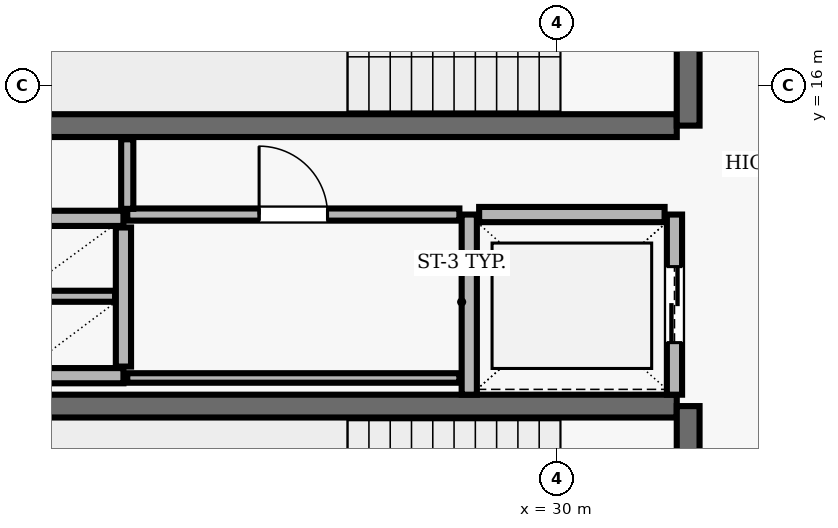
"""IFC4 building model, lengths in metres.
Left out: names, types, materials, properties, quantities, classifications, styles, units other than length and angle.
Written with IfcOpenShell. Run it as: python <this file> out.ifc"""

import sys

from ifc_helpers import new_model, si_unit, direction, frame, frame_2d, origin, place, context, subcontext, project, spatial, rectangle, extrude, element, fill, save


model = new_model("IFC4")
c1 = context("Model", 3, precision=1e-05, world=origin(), true_north=direction((0.0, 1.0)))
c2 = subcontext(c1, "Body", "Model", "MODEL_VIEW")
j1 = project(units=[si_unit("LENGTHUNIT", "METRE"), si_unit("PLANEANGLEUNIT", "RADIAN")], contexts=[c1])
p1 = place(None, origin())
s1 = spatial("IfcSite", under=j1, at=p1, CompositionType="ELEMENT")
p2 = place(p1, origin())
s2 = spatial("IfcBuilding", under=s1, at=p2, CompositionType="ELEMENT")
p3 = place(p2, frame((0.0, 0.0, 210.9)))
s3 = spatial("IfcBuildingStorey", under=s2, at=p3, CompositionType="ELEMENT", Elevation=210.9)
p4 = place(p3, frame((23.22, 15.47, 0.0), z_axis=(0.0, 0.0, 1.0), x_axis=(1.0, 0.0, 0.0)))
e1 = element("IfcWall", 1, at=p4, inside=s3, PredefinedType="SHEAR", context=c2, shape_type="SweptSolid", body=[
    extrude(rectangle(XDim=8.36, YDim=0.3, at=frame_2d((4.18, 0.0))), origin(), (0.0, 0.0, 1.0), 3.69),
])
p5 = place(p3, frame((31.73, 15.47, 0.0), z_axis=(0.0, 0.0, 1.0), x_axis=(0.0, 1.0, 0.0)))
e2 = element("IfcWall", 2, at=p5, inside=s3, PredefinedType="SHEAR", context=c2, shape_type="SweptSolid", body=[
    extrude(rectangle(XDim=3.51, YDim=0.3, at=frame_2d((1.755, 0.0))), origin(), (0.0, 0.0, 1.0), 3.69),
])
p6 = place(p5, frame((1.18, 0.0, 0.0)))
e3 = element("IfcOpeningElement", 3, at=p6, cuts=e2, PredefinedType="OPENING", context=c2, shape_type="SweptSolid", body=[
    extrude(rectangle(XDim=1.15, YDim=2.15, at=frame_2d((0.575, 1.075))), frame((0.0, 0.16, 0.0), z_axis=(0.0, -1.0, 0.0), x_axis=(1.0, 0.0, 0.0)), (0.0, 0.0, 1.0), 0.32),
])
p7 = place(p3, frame((31.58, 11.78, 0.0), z_axis=(0.0, 0.0, 1.0), x_axis=(-1.0, 0.0, 0.0)))
e4 = element("IfcWall", 4, at=p7, inside=s3, PredefinedType="SHEAR", context=c2, shape_type="SweptSolid", body=[
    extrude(rectangle(XDim=8.36, YDim=0.3, at=frame_2d((4.18, 0.0))), origin(), (0.0, 0.0, 1.0), 3.69),
])
p8 = place(p3, frame((31.73, 8.27, 0.0), z_axis=(0.0, 0.0, 1.0), x_axis=(0.0, 1.0, 0.0)))
e5 = element("IfcWall", 5, at=p8, inside=s3, PredefinedType="SHEAR", context=c2, shape_type="SweptSolid", body=[
    extrude(rectangle(XDim=3.51, YDim=0.3, at=frame_2d((1.755, 0.0))), origin(), (0.0, 0.0, 1.0), 3.69),
])
p9 = place(p8, frame((1.18, 0.0, 0.0)))
e6 = element("IfcOpeningElement", 6, at=p9, cuts=e5, PredefinedType="OPENING", context=c2, shape_type="SweptSolid", body=[
    extrude(rectangle(XDim=1.15, YDim=2.15, at=frame_2d((0.575, 1.075))), frame((0.0, 0.16, 0.0), z_axis=(0.0, -1.0, 0.0), x_axis=(1.0, 0.0, 0.0)), (0.0, 0.0, 1.0), 0.32),
])
p10 = place(p3, frame((28.85, 14.3, 0.0), z_axis=(0.0, 0.0, 1.0), x_axis=(0.0, -1.0, 0.0)))
e7 = element("IfcWall", 7, at=p10, inside=s3, PredefinedType="SOLIDWALL", context=c2, shape_type="SweptSolid", body=[
    extrude(rectangle(XDim=2.37, YDim=0.2, at=frame_2d((1.185, 0.0))), origin(), (0.0, 0.0, 1.0), 3.69),
])
p11 = place(p3, frame((31.55, 11.93, 0.0), z_axis=(0.0, 0.0, 1.0), x_axis=(0.0, 1.0, 0.0)))
e8 = element("IfcWall", 8, at=p11, inside=s3, PredefinedType="SOLIDWALL", context=c2, shape_type="SweptSolid", body=[
    extrude(rectangle(XDim=2.37, YDim=0.2, at=frame_2d((1.185, 0.0))), origin(), (0.0, 0.0, 1.0), 3.69),
])
p12 = place(p11, frame((0.685, 0.0, 0.0)))
e9 = element("IfcOpeningElement", 9, at=p12, cuts=e8, PredefinedType="OPENING", context=c2, shape_type="SweptSolid", body=[
    extrude(rectangle(XDim=1.0, YDim=2.1, at=frame_2d((0.5, 1.05))), frame((0.0, 0.11, 0.0), z_axis=(0.0, -1.0, 0.0), x_axis=(1.0, 0.0, 0.0)), (0.0, 0.0, 1.0), 0.22),
])
p13 = place(p3, frame((31.42, 14.3, 0.0), z_axis=(0.0, 0.0, 1.0), x_axis=(-1.0, 0.0, 0.0)))
e10 = element("IfcWall", 10, at=p13, inside=s3, PredefinedType="SOLIDWALL", context=c2, shape_type="SweptSolid", body=[
    extrude(rectangle(XDim=2.44, YDim=0.2, at=frame_2d((1.22, 0.0))), origin(), (0.0, 0.0, 1.0), 3.69),
])
for number, where, z_axis, x_axis in (
    (11, (22.9, 14.25, 0.0), (0.0, 0.0, 1.0), (1.0, 0.0, 0.0)),
    (12, (22.9, 12.18, 0.0), (0.0, 0.0, 1.0), (1.0, 0.0, 0.0)),
):
    element("IfcWall", number, at=place(p3, frame(where, z_axis=z_axis, x_axis=x_axis)), inside=s3, PredefinedType="SOLIDWALL", context=c2, shape_type="SweptSolid", body=[
        extrude(rectangle(XDim=1.4, YDim=0.2, at=frame_2d((0.7, 0.0))), origin(), (0.0, 0.0, 1.0), 3.69),
    ])
p14 = place(p3, frame((24.3, 12.3, 0.0), z_axis=(0.0, 0.0, 1.0), x_axis=(0.0, 1.0, 0.0)))
e13 = element("IfcWall", 13, at=p14, inside=s3, PredefinedType="SOLIDWALL", context=c2, shape_type="SweptSolid", body=[
    extrude(rectangle(XDim=1.83, YDim=0.2, at=frame_2d((0.915, 0.0))), origin(), (0.0, 0.0, 1.0), 3.69),
])
p15 = place(p3, frame((23.01, 13.225, 0.0), z_axis=(0.0, 0.0, 1.0), x_axis=(1.0, 0.0, 0.0)))
e14 = element("IfcWall", 14, at=p15, inside=s3, PredefinedType="PARTITIONING", context=c2, shape_type="SweptSolid", body=[
    extrude(rectangle(XDim=1.18, YDim=0.145, at=frame_2d((0.59, 0.0))), origin(), (0.0, 0.0, 1.0), 3.69),
])
p16 = place(p3, frame((24.35, 12.15, 0.0), z_axis=(0.0, 0.0, 1.0), x_axis=(1.0, 0.0, 0.0)))
e15 = element("IfcWall", 15, at=p16, inside=s3, PredefinedType="PARTITIONING", context=c2, shape_type="SweptSolid", body=[
    extrude(rectangle(XDim=4.37, YDim=0.125, at=frame_2d((2.185, 0.0))), origin(), (0.0, 0.0, 1.0), 3.69),
])
p17 = place(p3, frame((24.35, 14.3, 0.0), z_axis=(0.0, 0.0, 1.0), x_axis=(1.0, 0.0, 0.0)))
e16 = element("IfcWall", 16, at=p17, inside=s3, PredefinedType="PARTITIONING", context=c2, shape_type="SweptSolid", body=[
    extrude(rectangle(XDim=4.37, YDim=0.16, at=frame_2d((2.185, 0.0))), origin(), (0.0, 0.0, 1.0), 3.69),
])
p18 = place(p17, frame((1.735, 0.0, 0.0)))
e17 = element("IfcOpeningElement", 17, at=p18, cuts=e16, PredefinedType="OPENING", context=c2, shape_type="SweptSolid", body=[
    extrude(rectangle(XDim=0.9, YDim=2.1, at=frame_2d((0.45, 1.05))), frame((0.0, 0.09, 0.0), z_axis=(0.0, -1.0, 0.0), x_axis=(1.0, 0.0, 0.0)), (0.0, 0.0, 1.0), 0.18),
])
p19 = place(p3, frame((24.35, 15.29, 0.0), z_axis=(0.0, 0.0, 1.0), x_axis=(0.0, -1.0, 0.0)))
e18 = element("IfcWall", 18, at=p19, inside=s3, PredefinedType="PARTITIONING", context=c2, shape_type="SweptSolid", body=[
    extrude(rectangle(XDim=0.915, YDim=0.16, at=frame_2d((0.458, 0.0))), origin(), (0.0, 0.0, 1.0), 3.69),
])
p20 = place(p12, origin())
e19 = element("IfcDoor", 19, at=p20, inside=s3, OperationType="DOUBLE_DOOR_SLIDING", PredefinedType="DOOR", context=c2, shape_type="SweptSolid", body=[
    extrude(rectangle(XDim=1.0, YDim=2.1, at=frame_2d((0.5, 1.05))), frame((0.0, 0.025, 0.0), z_axis=(0.0, -1.0, 0.0), x_axis=(1.0, 0.0, 0.0)), (0.0, 0.0, 1.0), 0.05),
])
fill(e9, e19)
p21 = place(p18, origin())
e20 = element("IfcDoor", 20, at=p21, inside=s3, OperationType="SINGLE_SWING_LEFT", PredefinedType="DOOR", context=c2, shape_type="SweptSolid", body=[
    extrude(rectangle(XDim=0.9, YDim=2.1, at=frame_2d((0.45, 1.05))), frame((0.0, 0.025, 0.0), z_axis=(0.0, -1.0, 0.0), x_axis=(1.0, 0.0, 0.0)), (0.0, 0.0, 1.0), 0.05),
])
fill(e17, e20)
save(model, sys.argv[1])
